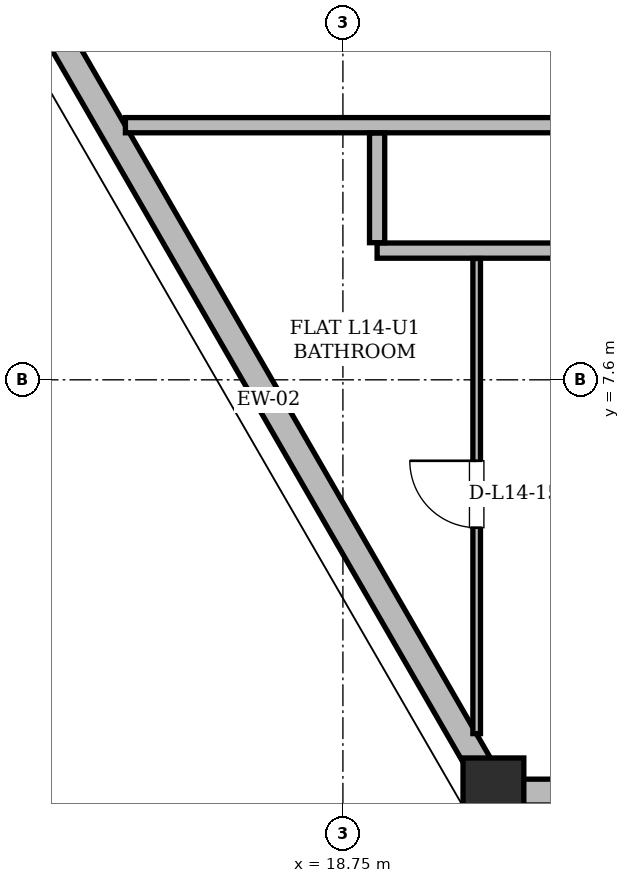
"""IFC4 building model, lengths in metres.
Left out: names, types, materials, properties, quantities, classifications, styles, units other than length and angle.
Written with IfcOpenShell. Run it as: python <this file> out.ifc"""

import sys

from ifc_helpers import new_model, si_unit, direction, frame, frame_2d, origin, origin_2d, place, context, subcontext, project, spatial, rectangle, hollow_rectangle, extrude, element, fill, save


model = new_model("IFC4")
c1 = context("Model", 3, precision=1e-05, world=origin(), true_north=direction((0.0, 1.0)))
c2 = subcontext(c1, "Body", "Model", "MODEL_VIEW")
j1 = project(units=[si_unit("LENGTHUNIT", "METRE"), si_unit("PLANEANGLEUNIT", "RADIAN")], contexts=[c1])
p1 = place(None, origin())
s1 = spatial("IfcSite", under=j1, at=p1, CompositionType="ELEMENT")
p2 = place(p1, origin())
s2 = spatial("IfcBuilding", under=s1, at=p2, CompositionType="ELEMENT")
p3 = place(p2, frame((0.0, 0.0, 56.1)))
s3 = spatial("IfcBuildingStorey", under=s2, at=p3, CompositionType="ELEMENT", Elevation=56.1)
p4 = place(p3, frame((20.753, 2.176, 0.004), z_axis=(-0.012707603766, 0.02711408504, 0.999551571055), x_axis=(-0.905486188563, -0.424375732484, 0.0)))
e1 = element("IfcColumn", 1, at=p4, inside=s3, PredefinedType="COLUMN", context=c2, shape_type="SweptSolid", body=[
    extrude(hollow_rectangle(XDim=0.8, YDim=0.8, WallThickness=0.065, at=origin_2d()), origin(), (0.0, 0.0, 1.0), 3.593),
])
p5 = place(p3, frame((13.604, 14.559, 0.0), z_axis=(0.0, 0.0, 1.0), x_axis=(0.500012153807, -0.866018386667, 0.0)))
e2 = element("IfcWall", 2, at=p5, inside=s3, PredefinedType="SOLIDWALL", context=c2, shape_type="SweptSolid", body=[
    extrude(rectangle(XDim=14.298, YDim=0.34, at=frame_2d((7.149, 0.0))), origin(), (0.0, 0.0, 1.0), 2.494),
])
p6 = place(p5, frame((1.174, 0.0, 1.28)))
e3 = element("IfcOpeningElement", 3, at=p6, cuts=e2, PredefinedType="OPENING", context=c2, shape_type="SweptSolid", body=[
    extrude(rectangle(XDim=0.85, YDim=0.92, at=frame_2d((0.425, 0.46))), frame((0.0, 0.17, 0.0), z_axis=(0.0, -1.0, 0.0), x_axis=(1.0, 0.0, 0.0)), (0.0, 0.0, 1.0), 0.34),
])
p7 = place(p3, frame((20.753, 2.176, 0.0), z_axis=(0.0, 0.0, 1.0), x_axis=(1.0, 0.0, 0.0)))
e4 = element("IfcWall", 4, at=p7, inside=s3, PredefinedType="SOLIDWALL", context=c2, shape_type="SweptSolid", body=[
    extrude(rectangle(XDim=33.494, YDim=0.34, at=frame_2d((16.747, 0.0))), origin(), (0.0, 0.0, 1.0), 2.494),
])
p8 = place(p7, frame((6.159, 0.0, 0.0)))
e5 = element("IfcOpeningElement", 5, at=p8, cuts=e4, PredefinedType="OPENING", context=c2, shape_type="SweptSolid", body=[
    extrude(rectangle(XDim=1.5, YDim=2.2, at=frame_2d((0.75, 1.1))), frame((0.0, 0.17, 0.0), z_axis=(0.0, -1.0, 0.0), x_axis=(1.0, 0.0, 0.0)), (0.0, 0.0, 1.0), 0.34),
])
p9 = place(p7, frame((24.169, 0.0, 0.0)))
e6 = element("IfcOpeningElement", 6, at=p9, cuts=e4, PredefinedType="OPENING", context=c2, shape_type="SweptSolid", body=[
    extrude(rectangle(XDim=1.5, YDim=2.2, at=frame_2d((0.75, 1.1))), frame((0.0, 0.17, 0.0), z_axis=(0.0, -1.0, 0.0), x_axis=(1.0, 0.0, 0.0)), (0.0, 0.0, 1.0), 0.34),
])
p10 = place(p7, frame((1.994, 0.0, 0.85)))
e7 = element("IfcOpeningElement", 7, at=p10, cuts=e4, PredefinedType="OPENING", context=c2, shape_type="SweptSolid", body=[
    extrude(rectangle(XDim=2.2, YDim=1.534, at=frame_2d((1.1, 0.767))), frame((0.0, 0.17, 0.0), z_axis=(0.0, -1.0, 0.0), x_axis=(1.0, 0.0, 0.0)), (0.0, 0.0, 1.0), 0.34),
])
p11 = place(p7, frame((12.612, 0.0, 0.85)))
e8 = element("IfcOpeningElement", 8, at=p11, cuts=e4, PredefinedType="OPENING", context=c2, shape_type="SweptSolid", body=[
    extrude(rectangle(XDim=1.6, YDim=1.534, at=frame_2d((0.8, 0.767))), frame((0.0, 0.17, 0.0), z_axis=(0.0, -1.0, 0.0), x_axis=(1.0, 0.0, 0.0)), (0.0, 0.0, 1.0), 0.34),
])
p12 = place(p7, frame((19.378, 0.0, 0.85)))
e9 = element("IfcOpeningElement", 9, at=p12, cuts=e4, PredefinedType="OPENING", context=c2, shape_type="SweptSolid", body=[
    extrude(rectangle(XDim=1.8, YDim=1.534, at=frame_2d((0.9, 0.767))), frame((0.0, 0.17, 0.0), z_axis=(0.0, -1.0, 0.0), x_axis=(1.0, 0.0, 0.0)), (0.0, 0.0, 1.0), 0.34),
])
p13 = place(p7, frame((30.119, 0.0, 0.85)))
e10 = element("IfcOpeningElement", 10, at=p13, cuts=e4, PredefinedType="OPENING", context=c2, shape_type="SweptSolid", body=[
    extrude(rectangle(XDim=2.2, YDim=1.534, at=frame_2d((1.1, 0.767))), frame((0.0, 0.17, 0.0), z_axis=(0.0, -1.0, 0.0), x_axis=(1.0, 0.0, 0.0)), (0.0, 0.0, 1.0), 0.34),
])
p14 = place(p3, frame((19.2, 9.3, 0.0), z_axis=(0.0, 0.0, 1.0), x_axis=(1.0, 0.0, 0.0)))
e11 = element("IfcWall", 11, at=p14, inside=s3, PredefinedType="PARTITIONING", context=c2, shape_type="SweptSolid", body=[
    extrude(rectangle(XDim=36.6, YDim=0.2, at=frame_2d((18.3, 0.0))), origin(), (0.0, 0.0, 1.0), 2.738),
])
p15 = place(p14, frame((10.855, 0.0, 0.0)))
e12 = element("IfcOpeningElement", 12, at=p15, cuts=e11, PredefinedType="OPENING", context=c2, shape_type="SweptSolid", body=[
    extrude(rectangle(XDim=1.0, YDim=2.18, at=frame_2d((0.5, 1.09))), frame((0.0, 0.1, 0.0), z_axis=(0.0, -1.0, 0.0), x_axis=(1.0, 0.0, 0.0)), (0.0, 0.0, 1.0), 0.2),
])
p16 = place(p14, frame((24.062, 0.0, 0.0)))
e13 = element("IfcOpeningElement", 13, at=p16, cuts=e11, PredefinedType="OPENING", context=c2, shape_type="SweptSolid", body=[
    extrude(rectangle(XDim=1.0, YDim=2.18, at=frame_2d((0.5, 1.09))), frame((0.0, 0.1, 0.0), z_axis=(0.0, -1.0, 0.0), x_axis=(1.0, 0.0, 0.0)), (0.0, 0.0, 1.0), 0.2),
])
p17 = place(p14, frame((31.904, 0.0, 0.0)))
e14 = element("IfcOpeningElement", 14, at=p17, cuts=e11, PredefinedType="OPENING", context=c2, shape_type="SweptSolid", body=[
    extrude(rectangle(XDim=1.0, YDim=2.18, at=frame_2d((0.5, 1.09))), frame((0.0, 0.1, 0.0), z_axis=(0.0, -1.0, 0.0), x_axis=(1.0, 0.0, 0.0)), (0.0, 0.0, 1.0), 0.2),
])
p18 = place(p3, frame((15.888, 10.95, 0.0), z_axis=(0.0, 0.0, 1.0), x_axis=(1.0, 0.0, 0.0)))
e15 = element("IfcWall", 15, at=p18, inside=s3, PredefinedType="PARTITIONING", context=c2, shape_type="SweptSolid", body=[
    extrude(rectangle(XDim=11.662, YDim=0.2, at=frame_2d((5.831, 0.0))), origin(), (0.0, 0.0, 1.0), 3.36),
])
p19 = place(p3, frame((19.2, 9.404, 0.0), z_axis=(0.0, 0.0, 1.0), x_axis=(0.0, 1.0, 0.0)))
e16 = element("IfcWall", 16, at=p19, inside=s3, PredefinedType="PARTITIONING", context=c2, shape_type="SweptSolid", body=[
    extrude(rectangle(XDim=1.442, YDim=0.2, at=frame_2d((0.721, 0.0))), origin(), (0.0, 0.0, 1.0), 3.36),
])
p20 = place(p3, frame((20.51, 2.945, 0.0), z_axis=(0.0, 0.0, 1.0), x_axis=(0.0, 1.0, 0.0)))
e17 = element("IfcWall", 17, at=p20, inside=s3, PredefinedType="PARTITIONING", context=c2, shape_type="SweptSolid", body=[
    extrude(rectangle(XDim=6.251, YDim=0.1, at=frame_2d((3.125, 0.0))), origin(), (0.0, 0.0, 1.0), 3.36),
])
p21 = place(p20, frame((2.709, 0.0, 0.0)))
e18 = element("IfcOpeningElement", 18, at=p21, cuts=e17, PredefinedType="OPENING", context=c2, shape_type="SweptSolid", body=[
    extrude(rectangle(XDim=0.88, YDim=2.08, at=frame_2d((0.44, 1.04))), frame((0.0, 0.05, 0.0), z_axis=(0.0, -1.0, 0.0), x_axis=(1.0, 0.0, 0.0)), (0.0, 0.0, 1.0), 0.1),
])
p22 = place(p21, origin())
e19 = element("IfcDoor", 19, at=p22, inside=s3, OperationType="SINGLE_SWING_RIGHT", PredefinedType="DOOR", context=c2, shape_type="SweptSolid", body=[
    extrude(rectangle(XDim=0.88, YDim=2.08, at=frame_2d((0.44, 1.04))), frame((0.0, 0.025, 0.0), z_axis=(0.0, -1.0, 0.0), x_axis=(1.0, 0.0, 0.0)), (0.0, 0.0, 1.0), 0.05),
])
fill(e18, e19)
save(model, sys.argv[1])
